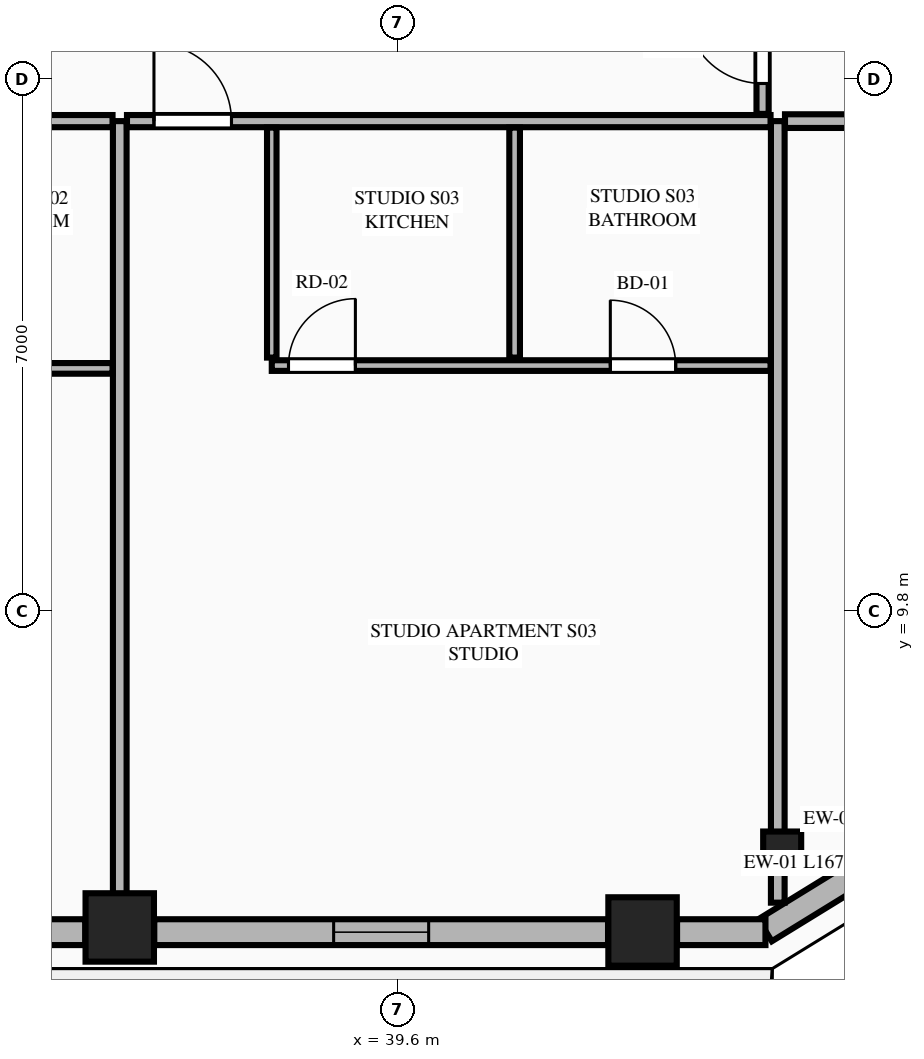
"""IFC4 building model, lengths in metres.
Left out: names, types, materials, properties, quantities, classifications, styles, units other than length and angle.
Written with IfcOpenShell. Run it as: python <this file> out.ifc"""

import sys

from ifc_helpers import new_model, si_unit, direction, frame, frame_2d, origin, origin_2d, place, context, subcontext, project, spatial, rectangle, extrude, element, fill, save


model = new_model("IFC4")
c1 = context("Model", 3, precision=1e-05, world=origin(), true_north=direction((0.0, 1.0)))
c2 = subcontext(c1, "Body", "Model", "MODEL_VIEW")
j1 = project(units=[si_unit("LENGTHUNIT", "METRE"), si_unit("PLANEANGLEUNIT", "RADIAN")], contexts=[c1])
p1 = place(None, origin())
s1 = spatial("IfcSite", under=j1, at=p1, CompositionType="ELEMENT")
p2 = place(p1, origin())
s2 = spatial("IfcBuilding", under=s1, at=p2, CompositionType="ELEMENT")
p3 = place(p2, frame((0.0, 0.0, 203.85)))
s3 = spatial("IfcBuildingStorey", under=s2, at=p3, CompositionType="ELEMENT", Elevation=203.85)
for number, where, z_axis, x_axis in (
    (1, (35.943, 5.642, 0.0), (0.0, 0.0, 1.0), (1.0, 0.0, 0.0)),
    (2, (42.821, 5.589, 0.0), (0.0, 0.0, 1.0), (1.0, 0.0, 0.0)),
):
    element("IfcColumn", number, at=place(p3, frame(where, z_axis=z_axis, x_axis=x_axis)), inside=s3, PredefinedType="COLUMN", context=c2, shape_type="SweptSolid", body=[
        extrude(rectangle(XDim=0.9, YDim=0.9, at=origin_2d()), origin(), (0.0, 0.0, 1.0), 3.55),
    ])
p4 = place(p3, frame((44.658, 6.654, 0.0), z_axis=(0.0, 0.0, 1.0), x_axis=(0.865230187018, 0.501374833306, 0.0)))
e3 = element("IfcColumn", 3, at=p4, inside=s3, PredefinedType="PILASTER", context=c2, shape_type="SweptSolid", body=[
    extrude(rectangle(XDim=0.5, YDim=0.35, at=origin_2d()), origin(), (0.0, 0.0, 1.0), 3.55),
])
p5 = place(p3, frame((44.433, 5.605, 0.0), z_axis=(0.0, 0.0, 1.0), x_axis=(0.851778214877, 0.523902541185, 0.0)))
e4 = element("IfcWall", 4, at=p5, inside=s3, PredefinedType="STANDARD", context=c2, shape_type="SweptSolid", body=[
    extrude(rectangle(XDim=1.678, YDim=0.34, at=frame_2d((0.839, 0.0))), origin(), (0.0, 0.0, 1.0), 3.35),
])
p6 = place(p3, frame((29.311, 5.58, 0.0), z_axis=(0.0, 0.0, 1.0), x_axis=(1.0, 0.0, 0.0)))
e5 = element("IfcWall", 5, at=p6, inside=s3, PredefinedType="STANDARD", context=c2, shape_type="SweptSolid", body=[
    extrude(rectangle(XDim=6.178, YDim=0.34, at=frame_2d((3.089, 0.0))), origin(), (0.0, 0.0, 1.0), 2.883),
])
p7 = place(p6, frame((2.539, 0.0, 0.0)))
e6 = element("IfcOpeningElement", 6, at=p7, cuts=e5, PredefinedType="OPENING", context=c2, shape_type="SweptSolid", body=[
    extrude(rectangle(XDim=1.1, YDim=2.25, at=frame_2d((0.55, 1.125))), frame((0.0, 0.18, 0.0), z_axis=(0.0, -1.0, 0.0), x_axis=(1.0, 0.0, 0.0)), (0.0, 0.0, 1.0), 0.36),
])
p8 = place(p3, frame((36.397, 5.58, 0.0), z_axis=(0.0, 0.0, 1.0), x_axis=(1.0, 0.0, 0.0)))
e7 = element("IfcWall", 7, at=p8, inside=s3, PredefinedType="STANDARD", context=c2, shape_type="SweptSolid", body=[
    extrude(rectangle(XDim=5.97, YDim=0.34, at=frame_2d((2.985, 0.0))), origin(), (0.0, 0.0, 1.0), 2.883),
])
p9 = place(p8, frame((2.36, 0.0, 0.75)))
e8 = element("IfcOpeningElement", 8, at=p9, cuts=e7, PredefinedType="OPENING", context=c2, shape_type="SweptSolid", body=[
    extrude(rectangle(XDim=1.25, YDim=1.95, at=frame_2d((0.625, 0.975))), frame((0.0, 0.18, 0.0), z_axis=(0.0, -1.0, 0.0), x_axis=(1.0, 0.0, 0.0)), (0.0, 0.0, 1.0), 0.36),
])
p10 = place(p3, frame((43.275, 5.58, 0.0), z_axis=(0.0, 0.0, 1.0), x_axis=(1.0, 0.0, 0.0)))
e9 = element("IfcWall", 9, at=p10, inside=s3, PredefinedType="STANDARD", context=c2, shape_type="SweptSolid", body=[
    extrude(rectangle(XDim=1.163, YDim=0.34, at=frame_2d((0.582, 0.0))), origin(), (0.0, 0.0, 1.0), 3.35),
])
p11 = place(p3, frame((35.943, 5.755, 0.0), z_axis=(0.0, 0.0, 1.0), x_axis=(0.0, 1.0, 0.0)))
e10 = element("IfcWall", 10, at=p11, inside=s3, PredefinedType="PARTITIONING", context=c2, shape_type="SweptSolid", body=[
    extrude(rectangle(XDim=10.495, YDim=0.18, at=frame_2d((5.248, 0.0))), origin(), (0.0, 0.0, 1.0), 2.807),
])
p12 = place(p3, frame((44.6, 5.968, 0.0), z_axis=(0.0, 0.0, 1.0), x_axis=(0.0, 1.0, 0.0)))
e11 = element("IfcWall", 11, at=p12, inside=s3, PredefinedType="PARTITIONING", context=c2, shape_type="SweptSolid", body=[
    extrude(rectangle(XDim=10.282, YDim=0.18, at=frame_2d((5.141, 0.0))), origin(), (0.0, 0.0, 1.0), 3.35),
])
p13 = place(p3, frame((28.952, 16.25, 0.0), z_axis=(0.0, 0.0, 1.0), x_axis=(1.0, 0.0, 0.0)))
e12 = element("IfcWall", 12, at=p13, inside=s3, PredefinedType="PARTITIONING", context=c2, shape_type="SweptSolid", body=[
    extrude(rectangle(XDim=6.896, YDim=0.16, at=frame_2d((3.448, 0.0))), origin(), (0.0, 0.0, 1.0), 3.35),
])
p14 = place(p13, frame((0.355, 0.0, 0.0)))
e13 = element("IfcOpeningElement", 13, at=p14, cuts=e12, PredefinedType="OPENING", context=c2, shape_type="SweptSolid", body=[
    extrude(rectangle(XDim=1.02, YDim=2.25, at=frame_2d((0.51, 1.125))), frame((0.0, 0.09, 0.0), z_axis=(0.0, -1.0, 0.0), x_axis=(1.0, 0.0, 0.0)), (0.0, 0.0, 1.0), 0.18),
])
p15 = place(p3, frame((30.857, 12.997, 0.0), z_axis=(0.0, 0.0, 1.0), x_axis=(1.0, 0.0, 0.0)))
e14 = element("IfcWall", 14, at=p15, inside=s3, PredefinedType="PLUMBINGWALL", context=c2, shape_type="SweptSolid", body=[
    extrude(rectangle(XDim=4.991, YDim=0.14, at=frame_2d((2.496, 0.0))), origin(), (0.0, 0.0, 1.0), 3.35),
])
p16 = place(p15, frame((3.291, 0.0, 0.0)))
e15 = element("IfcOpeningElement", 15, at=p16, cuts=e14, PredefinedType="OPENING", context=c2, shape_type="SweptSolid", body=[
    extrude(rectangle(XDim=0.86, YDim=2.1, at=frame_2d((0.43, 1.05))), frame((0.0, 0.08, 0.0), z_axis=(0.0, -1.0, 0.0), x_axis=(1.0, 0.0, 0.0)), (0.0, 0.0, 1.0), 0.16),
])
p17 = place(p15, frame((0.22, 0.0, 0.0)))
e16 = element("IfcOpeningElement", 16, at=p17, cuts=e14, PredefinedType="OPENING", context=c2, shape_type="SweptSolid", body=[
    extrude(rectangle(XDim=0.88, YDim=2.15, at=frame_2d((0.44, 1.075))), frame((0.0, 0.08, 0.0), z_axis=(0.0, -1.0, 0.0), x_axis=(1.0, 0.0, 0.0)), (0.0, 0.0, 1.0), 0.16),
])
p18 = place(p3, frame((36.038, 16.25, 0.0), z_axis=(0.0, 0.0, 1.0), x_axis=(1.0, 0.0, 0.0)))
e17 = element("IfcWall", 17, at=p18, inside=s3, PredefinedType="PARTITIONING", context=c2, shape_type="SweptSolid", body=[
    extrude(rectangle(XDim=8.467, YDim=0.16, at=frame_2d((4.233, 0.0))), origin(), (0.0, 0.0, 1.0), 3.35),
])
p19 = place(p18, frame((0.355, 0.0, 0.0)))
e18 = element("IfcOpeningElement", 18, at=p19, cuts=e17, PredefinedType="OPENING", context=c2, shape_type="SweptSolid", body=[
    extrude(rectangle(XDim=1.02, YDim=2.25, at=frame_2d((0.51, 1.125))), frame((0.0, 0.09, 0.0), z_axis=(0.0, -1.0, 0.0), x_axis=(1.0, 0.0, 0.0)), (0.0, 0.0, 1.0), 0.18),
])
p20 = place(p3, frame((37.943, 13.139, 0.0), z_axis=(0.0, 0.0, 1.0), x_axis=(0.0, 1.0, 0.0)))
e19 = element("IfcWall", 19, at=p20, inside=s3, PredefinedType="PARTITIONING", context=c2, shape_type="SweptSolid", body=[
    extrude(rectangle(XDim=3.026, YDim=0.125, at=frame_2d((1.513, 0.0))), origin(), (0.0, 0.0, 1.0), 3.35),
])
p21 = place(p3, frame((37.943, 13.034, 0.0), z_axis=(0.0, 0.0, 1.0), x_axis=(1.0, 0.0, 0.0)))
e20 = element("IfcWall", 20, at=p21, inside=s3, PredefinedType="PLUMBINGWALL", context=c2, shape_type="SweptSolid", body=[
    extrude(rectangle(XDim=6.562, YDim=0.14, at=frame_2d((3.281, 0.0))), origin(), (0.0, 0.0, 1.0), 3.35),
])
p22 = place(p21, frame((4.454, 0.0, 0.0)))
e21 = element("IfcOpeningElement", 21, at=p22, cuts=e20, PredefinedType="OPENING", context=c2, shape_type="SweptSolid", body=[
    extrude(rectangle(XDim=0.86, YDim=2.1, at=frame_2d((0.43, 1.05))), frame((0.0, 0.08, 0.0), z_axis=(0.0, -1.0, 0.0), x_axis=(1.0, 0.0, 0.0)), (0.0, 0.0, 1.0), 0.16),
])
p23 = place(p21, frame((0.22, 0.0, 0.0)))
e22 = element("IfcOpeningElement", 22, at=p23, cuts=e20, PredefinedType="OPENING", context=c2, shape_type="SweptSolid", body=[
    extrude(rectangle(XDim=0.88, YDim=2.15, at=frame_2d((0.44, 1.075))), frame((0.0, 0.08, 0.0), z_axis=(0.0, -1.0, 0.0), x_axis=(1.0, 0.0, 0.0)), (0.0, 0.0, 1.0), 0.16),
])
p24 = place(p3, frame((41.138, 13.139, 0.0), z_axis=(0.0, 0.0, 1.0), x_axis=(0.0, 1.0, 0.0)))
e23 = element("IfcWall", 23, at=p24, inside=s3, PredefinedType="PLUMBINGWALL", context=c2, shape_type="SweptSolid", body=[
    extrude(rectangle(XDim=3.026, YDim=0.14, at=frame_2d((1.513, 0.0))), origin(), (0.0, 0.0, 1.0), 3.35),
])
p25 = place(p3, frame((44.695, 16.25, 0.0), z_axis=(0.0, 0.0, 1.0), x_axis=(1.0, 0.0, 0.0)))
e24 = element("IfcWall", 24, at=p25, inside=s3, PredefinedType="PARTITIONING", context=c2, shape_type="SweptSolid", body=[
    extrude(rectangle(XDim=5.894, YDim=0.18, at=frame_2d((2.947, 0.0))), origin(), (0.0, 0.0, 1.0), 3.35),
])
p26 = place(p3, frame((44.4, 16.345, 0.0), z_axis=(0.0, 0.0, 1.0), x_axis=(0.0, 1.0, 0.0)))
e25 = element("IfcWall", 25, at=p26, inside=s3, PredefinedType="PARTITIONING", context=c2, shape_type="SweptSolid", body=[
    extrude(rectangle(XDim=6.236, YDim=0.16, at=frame_2d((3.118, 0.0))), origin(), (0.0, 0.0, 1.0), 3.35),
])
p27 = place(p26, frame((0.4, 0.0, 0.0)))
e26 = element("IfcOpeningElement", 26, at=p27, cuts=e25, PredefinedType="OPENING", context=c2, shape_type="SweptSolid", body=[
    extrude(rectangle(XDim=1.02, YDim=2.25, at=frame_2d((0.51, 1.125))), frame((0.0, 0.09, 0.0), z_axis=(0.0, -1.0, 0.0), x_axis=(1.0, 0.0, 0.0)), (0.0, 0.0, 1.0), 0.18),
])
p28 = place(p9, origin())
e27 = element("IfcWindow", 27, at=p28, inside=s3, PartitioningType="SINGLE_PANEL", PredefinedType="WINDOW", context=c2, shape_type="SweptSolid", body=[
    extrude(rectangle(XDim=1.25, YDim=1.95, at=frame_2d((0.625, 0.975))), frame((0.0, 0.03, 0.0), z_axis=(0.0, -1.0, 0.0), x_axis=(1.0, 0.0, 0.0)), (0.0, 0.0, 1.0), 0.06),
])
fill(e8, e27)
p29 = place(p22, origin())
e28 = element("IfcDoor", 28, at=p29, inside=s3, OperationType="SINGLE_SWING_LEFT", PredefinedType="DOOR", context=c2, shape_type="SweptSolid", body=[
    extrude(rectangle(XDim=0.86, YDim=2.1, at=frame_2d((0.43, 1.05))), frame((0.0, 0.025, 0.0), z_axis=(0.0, -1.0, 0.0), x_axis=(1.0, 0.0, 0.0)), (0.0, 0.0, 1.0), 0.05),
])
fill(e21, e28)
p30 = place(p19, origin())
e29 = element("IfcDoor", 29, at=p30, inside=s3, OperationType="SINGLE_SWING_LEFT", PredefinedType="DOOR", context=c2, shape_type="SweptSolid", body=[
    extrude(rectangle(XDim=1.02, YDim=2.25, at=frame_2d((0.51, 1.125))), frame((0.0, 0.025, 0.0), z_axis=(0.0, -1.0, 0.0), x_axis=(1.0, 0.0, 0.0)), (0.0, 0.0, 1.0), 0.05),
])
fill(e18, e29)
p31 = place(p23, origin())
e30 = element("IfcDoor", 30, at=p31, inside=s3, OperationType="SINGLE_SWING_RIGHT", PredefinedType="DOOR", context=c2, shape_type="SweptSolid", body=[
    extrude(rectangle(XDim=0.88, YDim=2.15, at=frame_2d((0.44, 1.075))), frame((0.0, 0.025, 0.0), z_axis=(0.0, -1.0, 0.0), x_axis=(1.0, 0.0, 0.0)), (0.0, 0.0, 1.0), 0.05),
])
fill(e22, e30)
p32 = place(p27, origin())
e31 = element("IfcDoor", 31, at=p32, inside=s3, OperationType="SINGLE_SWING_RIGHT", PredefinedType="DOOR", context=c2, shape_type="SweptSolid", body=[
    extrude(rectangle(XDim=1.02, YDim=2.25, at=frame_2d((0.51, 1.125))), frame((0.0, 0.025, 0.0), z_axis=(0.0, -1.0, 0.0), x_axis=(1.0, 0.0, 0.0)), (0.0, 0.0, 1.0), 0.05),
])
fill(e26, e31)
save(model, sys.argv[1])
